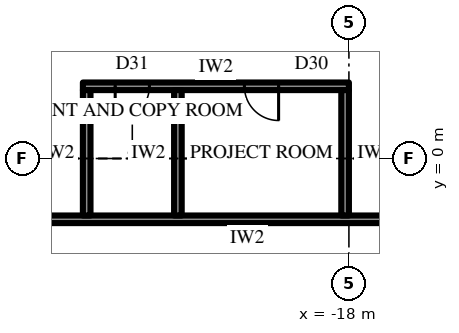
"""IFC4 building model, lengths in metres.
Left out: names, types, materials, properties, quantities, classifications, styles, units other than length and angle.
Written with IfcOpenShell. Run it as: python <this file> out.ifc"""

import sys

from ifc_helpers import new_model, si_unit, direction, frame, frame_2d, origin, place, context, subcontext, project, spatial, rectangle, extrude, element, fill, save


model = new_model("IFC4")
c1 = context("Model", 3, precision=1e-05, world=origin(), true_north=direction((0.0, 1.0)))
c2 = subcontext(c1, "Body", "Model", "MODEL_VIEW")
j1 = project(units=[si_unit("LENGTHUNIT", "METRE"), si_unit("PLANEANGLEUNIT", "RADIAN")], contexts=[c1])
p1 = place(None, origin())
s1 = spatial("IfcSite", under=j1, at=p1, CompositionType="ELEMENT")
p2 = place(p1, origin())
s2 = spatial("IfcBuilding", under=s1, at=p2, CompositionType="ELEMENT")
p3 = place(p2, frame((0.0, 0.0, 332.5)))
s3 = spatial("IfcBuildingStorey", under=s2, at=p3, CompositionType="ELEMENT", Elevation=332.5)
p4 = place(p3, frame((-29.459, -2.175, 0.0), z_axis=(0.0, 0.0, 1.0), x_axis=(0.499996453679, -0.866027451244, 0.0)))
e1 = element("IfcWall", 1, at=p4, inside=s3, PredefinedType="SOLIDWALL", context=c2, shape_type="SweptSolid", body=[
    extrude(rectangle(XDim=9.564, YDim=0.3, at=frame_2d((4.782, 0.0))), origin(), (0.0, 0.0, 1.0), 2.9),
])
p5 = place(p4, frame((0.866, 0.0, 0.6)))
e2 = element("IfcOpeningElement", 2, at=p5, cuts=e1, PredefinedType="OPENING", context=c2, shape_type="SweptSolid", body=[
    extrude(rectangle(XDim=2.55, YDim=2.05, at=frame_2d((1.275, 1.025))), frame((0.0, 0.16, 0.0), z_axis=(0.0, -1.0, 0.0), x_axis=(1.0, 0.0, 0.0)), (0.0, 0.0, 1.0), 0.32),
])
p6 = place(p4, frame((5.823, 0.0, 0.0)))
e3 = element("IfcOpeningElement", 3, at=p6, cuts=e1, PredefinedType="OPENING", context=c2, shape_type="SweptSolid", body=[
    extrude(rectangle(XDim=1.2, YDim=2.4, at=frame_2d((0.6, 1.2))), frame((0.0, 0.16, 0.0), z_axis=(0.0, -1.0, 0.0), x_axis=(1.0, 0.0, 0.0)), (0.0, 0.0, 1.0), 0.32),
])
p7 = place(p3, frame((-12.425, -1.6, 0.0), z_axis=(0.0, 0.0, 1.0), x_axis=(-1.0, 0.0, 0.0)))
e4 = element("IfcWall", 4, at=p7, inside=s3, PredefinedType="PARTITIONING", context=c2, shape_type="SweptSolid", body=[
    extrude(rectangle(XDim=16.5, YDim=0.2, at=frame_2d((8.25, 0.0))), origin(), (0.0, 0.0, 1.0), 4.0),
])
p8 = place(p7, frame((1.15, 0.0, 0.0)))
e5 = element("IfcOpeningElement", 5, at=p8, cuts=e4, PredefinedType="OPENING", context=c2, shape_type="SweptSolid", body=[
    extrude(rectangle(XDim=1.0, YDim=2.2, at=frame_2d((0.5, 1.1))), frame((0.0, 0.11, 0.0), z_axis=(0.0, -1.0, 0.0), x_axis=(1.0, 0.0, 0.0)), (0.0, 0.0, 1.0), 0.22),
])
p9 = place(p3, frame((-18.0, 1.9, 0.0), z_axis=(0.0, 0.0, 1.0), x_axis=(-1.0, 0.0, 0.0)))
e6 = element("IfcWall", 6, at=p9, inside=s3, PredefinedType="PARTITIONING", context=c2, shape_type="SweptSolid", body=[
    extrude(rectangle(XDim=7.0, YDim=0.2, at=frame_2d((3.5, 0.0))), origin(), (0.0, 0.0, 1.0), 4.0),
])
p10 = place(p9, frame((1.85, 0.0, 0.0)))
e7 = element("IfcOpeningElement", 7, at=p10, cuts=e6, PredefinedType="OPENING", context=c2, shape_type="SweptSolid", body=[
    extrude(rectangle(XDim=0.9, YDim=2.2, at=frame_2d((0.45, 1.1))), frame((0.0, 0.11, 0.0), z_axis=(0.0, -1.0, 0.0), x_axis=(1.0, 0.0, 0.0)), (0.0, 0.0, 1.0), 0.22),
])
p11 = place(p9, frame((5.25, 0.0, 0.0)))
e8 = element("IfcOpeningElement", 8, at=p11, cuts=e6, PredefinedType="OPENING", context=c2, shape_type="SweptSolid", body=[
    extrude(rectangle(XDim=0.9, YDim=2.2, at=frame_2d((0.45, 1.1))), frame((0.0, 0.11, 0.0), z_axis=(0.0, -1.0, 0.0), x_axis=(1.0, 0.0, 0.0)), (0.0, 0.0, 1.0), 0.22),
])
for number, where, z_axis, x_axis in (
    (9, (-18.1, -1.5, 0.0), (0.0, 0.0, 1.0), (0.0, 1.0, 0.0)),
    (10, (-22.5, -1.5, 0.0), (0.0, 0.0, 1.0), (0.0, 1.0, 0.0)),
    (11, (-24.9, -1.5, 0.0), (0.0, 0.0, 1.0), (0.0, 1.0, 0.0)),
):
    element("IfcWall", number, at=place(p3, frame(where, z_axis=z_axis, x_axis=x_axis)), inside=s3, PredefinedType="PARTITIONING", context=c2, shape_type="SweptSolid", body=[
        extrude(rectangle(XDim=3.3, YDim=0.2, at=frame_2d((1.65, 0.0))), origin(), (0.0, 0.0, 1.0), 4.0),
    ])
p12 = place(p10, origin())
e12 = element("IfcDoor", 12, at=p12, inside=s3, OperationType="SINGLE_SWING_RIGHT", PredefinedType="DOOR", context=c2, shape_type="SweptSolid", body=[
    extrude(rectangle(XDim=0.9, YDim=2.2, at=frame_2d((0.45, 1.1))), frame((0.0, 0.025, 0.0), z_axis=(0.0, -1.0, 0.0), x_axis=(1.0, 0.0, 0.0)), (0.0, 0.0, 1.0), 0.05),
])
fill(e7, e12)
p13 = place(p11, origin())
e13 = element("IfcDoor", 13, at=p13, inside=s3, OperationType="SINGLE_SWING_LEFT", PredefinedType="DOOR", context=c2, shape_type="SweptSolid", body=[
    extrude(rectangle(XDim=0.9, YDim=2.2, at=frame_2d((0.45, 1.1))), frame((0.0, 0.025, 0.0), z_axis=(0.0, -1.0, 0.0), x_axis=(1.0, 0.0, 0.0)), (0.0, 0.0, 1.0), 0.05),
])
fill(e8, e13)
save(model, sys.argv[1])
